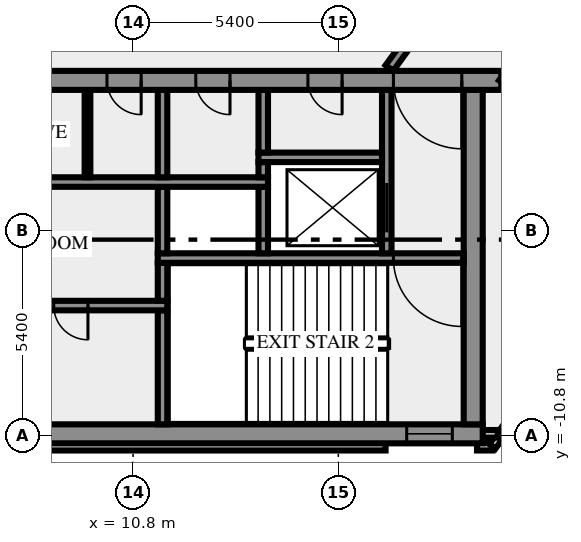
"""IFC4 building model, lengths in metres.
Left out: names, types, materials, properties, quantities, classifications, styles, units other than length and angle.
Written with IfcOpenShell. Run it as: python <this file> out.ifc"""

import sys

from ifc_helpers import new_model, si_unit, direction, frame, frame_2d, origin, place, context, subcontext, project, spatial, rectangle, extrude, element, fill, save


model = new_model("IFC4")
c1 = context("Model", 3, precision=1e-05, world=origin(), true_north=direction((0.0, 1.0)))
c2 = subcontext(c1, "Body", "Model", "MODEL_VIEW")
j1 = project(units=[si_unit("LENGTHUNIT", "METRE"), si_unit("PLANEANGLEUNIT", "RADIAN")], contexts=[c1])
p1 = place(None, origin())
s1 = spatial("IfcSite", under=j1, at=p1, CompositionType="ELEMENT")
p2 = place(p1, origin())
s2 = spatial("IfcBuilding", under=s1, at=p2, CompositionType="ELEMENT")
p3 = place(p2, frame((0.0, 0.0, 265.0)))
s3 = spatial("IfcBuildingStorey", under=s2, at=p3, CompositionType="ELEMENT", Elevation=265.0)
p4 = place(p3, frame((-17.444, -11.088, 0.0), z_axis=(0.0, 0.0, 1.0), x_axis=(1.0, 0.0, 0.0)))
e1 = element("IfcWall", 1, at=p4, inside=s3, PredefinedType="SOLIDWALL", context=c2, shape_type="SweptSolid", body=[
    extrude(rectangle(XDim=34.888, YDim=0.2, at=frame_2d((17.444, 0.0))), origin(), (0.0, 0.0, 1.0), 3.65),
])
p5 = place(p3, frame((19.85, -11.088, 0.0), z_axis=(0.0, 0.0, 1.0), x_axis=(1.0, 0.0, 0.0)))
e2 = element("IfcWall", 2, at=p5, inside=s3, PredefinedType="SOLIDWALL", context=c2, shape_type="SweptSolid", body=[
    extrude(rectangle(XDim=0.406, YDim=0.2, at=frame_2d((0.203, 0.0))), origin(), (0.0, 0.0, 1.0), 3.65),
])
p6 = place(p3, frame((20.253, -11.083, 0.0), z_axis=(0.0, 0.0, 1.0), x_axis=(0.587766567315, 0.809030569476, 0.0)))
e3 = element("IfcWall", 3, at=p6, inside=s3, PredefinedType="SOLIDWALL", context=c2, shape_type="SweptSolid", body=[
    extrude(rectangle(XDim=2.688, YDim=0.2, at=frame_2d((1.344, 0.0))), origin(), (0.0, 0.0, 1.0), 3.65),
])
p7 = place(p3, frame((19.98, -10.75, 0.0), z_axis=(0.0, 0.0, 1.0), x_axis=(1.0, 0.0, 0.0)))
e4 = element("IfcWall", 4, at=p7, inside=s3, PredefinedType="SOLIDWALL", context=c2, shape_type="SweptSolid", body=[
    extrude(rectangle(XDim=0.417, YDim=0.2, at=frame_2d((0.208, 0.0))), origin(), (0.0, 0.0, 1.0), 3.65),
])
p8 = place(p3, frame((-20.0, -10.75, 0.0), z_axis=(0.0, 0.0, 1.0), x_axis=(1.0, 0.0, 0.0)))
e5 = element("IfcWall", 5, at=p8, inside=s3, PredefinedType="SHEAR", context=c2, shape_type="SweptSolid", body=[
    extrude(rectangle(XDim=40.0, YDim=0.5, at=frame_2d((20.0, 0.0))), origin(), (0.0, 0.0, 1.0), 3.65),
])
p9 = place(p8, frame((0.8, 0.0, 1.0)))
e6 = element("IfcOpeningElement", 6, at=p9, cuts=e5, PredefinedType="OPENING", context=c2, shape_type="SweptSolid", body=[
    extrude(rectangle(XDim=1.2, YDim=1.2, at=frame_2d((0.6, 0.6))), frame((0.0, 0.26, 0.0), z_axis=(0.0, -1.0, 0.0), x_axis=(1.0, 0.0, 0.0)), (0.0, 0.0, 1.0), 0.52),
])
p10 = place(p8, frame((38.0, 0.0, 1.0)))
e7 = element("IfcOpeningElement", 7, at=p10, cuts=e5, PredefinedType="OPENING", context=c2, shape_type="SweptSolid", body=[
    extrude(rectangle(XDim=1.2, YDim=1.2, at=frame_2d((0.6, 0.6))), frame((0.0, 0.26, 0.0), z_axis=(0.0, -1.0, 0.0), x_axis=(1.0, 0.0, 0.0)), (0.0, 0.0, 1.0), 0.52),
])
p11 = place(p3, frame((11.575, -10.5, 0.0), z_axis=(0.0, 0.0, 1.0), x_axis=(0.0, 1.0, 0.0)))
e8 = element("IfcWall", 8, at=p11, inside=s3, PredefinedType="SHEAR", context=c2, shape_type="SweptSolid", body=[
    extrude(rectangle(XDim=3.0, YDim=0.25, at=frame_2d((1.5, 0.0))), origin(), (0.0, 0.0, 1.0), 3.65),
])
p12 = place(p3, frame((19.75, -10.5, 0.0), z_axis=(0.0, 0.0, 1.0), x_axis=(0.0, 1.0, 0.0)))
e9 = element("IfcWall", 9, at=p12, inside=s3, PredefinedType="SHEAR", context=c2, shape_type="SweptSolid", body=[
    extrude(rectangle(XDim=8.8, YDim=0.5, at=frame_2d((4.4, 0.0))), origin(), (0.0, 0.0, 1.0), 3.65),
])
p13 = place(p3, frame((11.7, -7.375, 0.0), z_axis=(0.0, 0.0, 1.0), x_axis=(-1.0, 0.0, 0.0)))
e10 = element("IfcWall", 10, at=p13, inside=s3, PredefinedType="SHEAR", context=c2, shape_type="SweptSolid", body=[
    extrude(rectangle(XDim=23.4, YDim=0.25, at=frame_2d((11.7, 0.0))), origin(), (0.0, 0.0, 1.0), 3.65),
])
p14 = place(p13, frame((22.225, 0.0, 0.0)))
e11 = element("IfcOpeningElement", 11, at=p14, cuts=e10, PredefinedType="OPENING", context=c2, shape_type="SweptSolid", body=[
    extrude(rectangle(XDim=0.8, YDim=2.1, at=frame_2d((0.4, 1.05))), frame((0.0, 0.135, 0.0), z_axis=(0.0, -1.0, 0.0), x_axis=(1.0, 0.0, 0.0)), (0.0, 0.0, 1.0), 0.27),
])
p15 = place(p13, frame((20.2, 0.0, 0.0)))
e12 = element("IfcOpeningElement", 12, at=p15, cuts=e10, PredefinedType="OPENING", context=c2, shape_type="SweptSolid", body=[
    extrude(rectangle(XDim=1.1, YDim=2.1, at=frame_2d((0.55, 1.05))), frame((0.0, 0.135, 0.0), z_axis=(0.0, -1.0, 0.0), x_axis=(1.0, 0.0, 0.0)), (0.0, 0.0, 1.0), 0.27),
])
p16 = place(p13, frame((17.7, 0.0, 0.0)))
e13 = element("IfcOpeningElement", 13, at=p16, cuts=e10, PredefinedType="OPENING", context=c2, shape_type="SweptSolid", body=[
    extrude(rectangle(XDim=1.1, YDim=2.1, at=frame_2d((0.55, 1.05))), frame((0.0, 0.135, 0.0), z_axis=(0.0, -1.0, 0.0), x_axis=(1.0, 0.0, 0.0)), (0.0, 0.0, 1.0), 0.27),
])
p17 = place(p13, frame((15.975, 0.0, 0.0)))
e14 = element("IfcOpeningElement", 14, at=p17, cuts=e10, PredefinedType="OPENING", context=c2, shape_type="SweptSolid", body=[
    extrude(rectangle(XDim=0.8, YDim=2.1, at=frame_2d((0.4, 1.05))), frame((0.0, 0.135, 0.0), z_axis=(0.0, -1.0, 0.0), x_axis=(1.0, 0.0, 0.0)), (0.0, 0.0, 1.0), 0.27),
])
p18 = place(p13, frame((14.75, 0.0, 0.0)))
e15 = element("IfcOpeningElement", 15, at=p18, cuts=e10, PredefinedType="OPENING", context=c2, shape_type="SweptSolid", body=[
    extrude(rectangle(XDim=0.7, YDim=2.1, at=frame_2d((0.35, 1.05))), frame((0.0, 0.135, 0.0), z_axis=(0.0, -1.0, 0.0), x_axis=(1.0, 0.0, 0.0)), (0.0, 0.0, 1.0), 0.27),
])
p19 = place(p13, frame((13.35, 0.0, 0.0)))
e16 = element("IfcOpeningElement", 16, at=p19, cuts=e10, PredefinedType="OPENING", context=c2, shape_type="SweptSolid", body=[
    extrude(rectangle(XDim=0.9, YDim=2.1, at=frame_2d((0.45, 1.05))), frame((0.0, 0.135, 0.0), z_axis=(0.0, -1.0, 0.0), x_axis=(1.0, 0.0, 0.0)), (0.0, 0.0, 1.0), 0.27),
])
p20 = place(p13, frame((11.975, 0.0, 0.0)))
e17 = element("IfcOpeningElement", 17, at=p20, cuts=e10, PredefinedType="OPENING", context=c2, shape_type="SweptSolid", body=[
    extrude(rectangle(XDim=0.9, YDim=2.1, at=frame_2d((0.45, 1.05))), frame((0.0, 0.135, 0.0), z_axis=(0.0, -1.0, 0.0), x_axis=(1.0, 0.0, 0.0)), (0.0, 0.0, 1.0), 0.27),
])
p21 = place(p13, frame((10.5, 0.0, 0.0)))
e18 = element("IfcOpeningElement", 18, at=p21, cuts=e10, PredefinedType="OPENING", context=c2, shape_type="SweptSolid", body=[
    extrude(rectangle(XDim=0.9, YDim=2.1, at=frame_2d((0.45, 1.05))), frame((0.0, 0.135, 0.0), z_axis=(0.0, -1.0, 0.0), x_axis=(1.0, 0.0, 0.0)), (0.0, 0.0, 1.0), 0.27),
])
p22 = place(p13, frame((8.663, 0.0, 0.0)))
e19 = element("IfcOpeningElement", 19, at=p22, cuts=e10, PredefinedType="OPENING", context=c2, shape_type="SweptSolid", body=[
    extrude(rectangle(XDim=0.9, YDim=2.1, at=frame_2d((0.45, 1.05))), frame((0.0, 0.135, 0.0), z_axis=(0.0, -1.0, 0.0), x_axis=(1.0, 0.0, 0.0)), (0.0, 0.0, 1.0), 0.27),
])
p23 = place(p13, frame((6.05, 0.0, 0.0)))
e20 = element("IfcOpeningElement", 20, at=p23, cuts=e10, PredefinedType="OPENING", context=c2, shape_type="SweptSolid", body=[
    extrude(rectangle(XDim=0.9, YDim=2.1, at=frame_2d((0.45, 1.05))), frame((0.0, 0.135, 0.0), z_axis=(0.0, -1.0, 0.0), x_axis=(1.0, 0.0, 0.0)), (0.0, 0.0, 1.0), 0.27),
])
p24 = place(p13, frame((2.088, 0.0, 0.0)))
e21 = element("IfcOpeningElement", 21, at=p24, cuts=e10, PredefinedType="OPENING", context=c2, shape_type="SweptSolid", body=[
    extrude(rectangle(XDim=0.9, YDim=2.1, at=frame_2d((0.45, 1.05))), frame((0.0, 0.135, 0.0), z_axis=(0.0, -1.0, 0.0), x_axis=(1.0, 0.0, 0.0)), (0.0, 0.0, 1.0), 0.27),
])
p25 = place(p3, frame((11.575, -7.25, 0.0), z_axis=(0.0, 0.0, 1.0), x_axis=(0.0, 1.0, 0.0)))
e22 = element("IfcWall", 22, at=p25, inside=s3, PredefinedType="SHEAR", context=c2, shape_type="SweptSolid", body=[
    extrude(rectangle(XDim=1.0, YDim=0.25, at=frame_2d((0.5, 0.0))), origin(), (0.0, 0.0, 1.0), 3.65),
])
p26 = place(p3, frame((19.5, -6.125, 0.0), z_axis=(0.0, 0.0, 1.0), x_axis=(-1.0, 0.0, 0.0)))
e23 = element("IfcWall", 23, at=p26, inside=s3, PredefinedType="SHEAR", context=c2, shape_type="SweptSolid", body=[
    extrude(rectangle(XDim=8.05, YDim=0.25, at=frame_2d((4.025, 0.0))), origin(), (0.0, 0.0, 1.0), 3.65),
])
p27 = place(p26, frame((0.05, 0.0, 0.0)))
e24 = element("IfcOpeningElement", 24, at=p27, cuts=e23, PredefinedType="OPENING", context=c2, shape_type="SweptSolid", body=[
    extrude(rectangle(XDim=1.8, YDim=2.1, at=frame_2d((0.9, 1.05))), frame((0.0, 0.135, 0.0), z_axis=(0.0, -1.0, 0.0), x_axis=(1.0, 0.0, 0.0)), (0.0, 0.0, 1.0), 0.27),
])
for number, where, z_axis, x_axis in (
    (25, (11.575, -6.0, 0.0), (0.0, 0.0, 1.0), (0.0, 1.0, 0.0)),
    (26, (14.225, -6.0, 0.0), (0.0, 0.0, 1.0), (0.0, 1.0, 0.0)),
):
    element("IfcWall", number, at=place(p3, frame(where, z_axis=z_axis, x_axis=x_axis)), inside=s3, PredefinedType="SHEAR", context=c2, shape_type="SweptSolid", body=[
        extrude(rectangle(XDim=1.75, YDim=0.25, at=frame_2d((0.875, 0.0))), origin(), (0.0, 0.0, 1.0), 3.65),
    ])
p28 = place(p3, frame((17.475, -6.0, 0.0), z_axis=(0.0, 0.0, 1.0), x_axis=(0.0, 1.0, 0.0)))
e27 = element("IfcWall", 27, at=p28, inside=s3, PredefinedType="SHEAR", context=c2, shape_type="SweptSolid", body=[
    extrude(rectangle(XDim=4.3, YDim=0.25, at=frame_2d((2.15, 0.0))), origin(), (0.0, 0.0, 1.0), 3.65),
])
p29 = place(p28, frame((0.55, 0.0, 0.0)))
e28 = element("IfcOpeningElement", 28, at=p29, cuts=e27, PredefinedType="OPENING", context=c2, shape_type="SweptSolid", body=[
    extrude(rectangle(XDim=1.3, YDim=2.1, at=frame_2d((0.65, 1.05))), frame((0.0, 0.135, 0.0), z_axis=(0.0, -1.0, 0.0), x_axis=(1.0, 0.0, 0.0)), (0.0, 0.0, 1.0), 0.27),
])
p30 = place(p3, frame((1.45, -4.125, 0.0), z_axis=(0.0, 0.0, 1.0), x_axis=(1.0, 0.0, 0.0)))
e29 = element("IfcWall", 29, at=p30, inside=s3, PredefinedType="SHEAR", context=c2, shape_type="SweptSolid", body=[
    extrude(rectangle(XDim=12.9, YDim=0.25, at=frame_2d((6.45, 0.0))), origin(), (0.0, 0.0, 1.0), 3.65),
])
p31 = place(p30, frame((0.7, 0.0, 0.0)))
e30 = element("IfcOpeningElement", 30, at=p31, cuts=e29, PredefinedType="OPENING", context=c2, shape_type="SweptSolid", body=[
    extrude(rectangle(XDim=1.3, YDim=2.1, at=frame_2d((0.65, 1.05))), frame((0.0, 0.135, 0.0), z_axis=(0.0, -1.0, 0.0), x_axis=(1.0, 0.0, 0.0)), (0.0, 0.0, 1.0), 0.27),
])
p32 = place(p3, frame((9.6, -4.0, 0.0), z_axis=(0.0, 0.0, 1.0), x_axis=(0.0, 1.0, 0.0)))
e31 = element("IfcWall", 31, at=p32, inside=s3, PredefinedType="PARTITIONING", context=c2, shape_type="SweptSolid", body=[
    extrude(rectangle(XDim=2.3, YDim=0.15, at=frame_2d((1.15, 0.0))), origin(), (0.0, 0.0, 1.0), 3.65),
])
p33 = place(p3, frame((11.575, -4.0, 0.0), z_axis=(0.0, 0.0, 1.0), x_axis=(0.0, 1.0, 0.0)))
e32 = element("IfcWall", 32, at=p33, inside=s3, PredefinedType="SHEAR", context=c2, shape_type="SweptSolid", body=[
    extrude(rectangle(XDim=2.3, YDim=0.25, at=frame_2d((1.15, 0.0))), origin(), (0.0, 0.0, 1.0), 3.65),
])
p34 = place(p3, frame((14.225, -4.0, 0.0), z_axis=(0.0, 0.0, 1.0), x_axis=(0.0, 1.0, 0.0)))
e33 = element("IfcWall", 33, at=p34, inside=s3, PredefinedType="SHEAR", context=c2, shape_type="SweptSolid", body=[
    extrude(rectangle(XDim=0.4, YDim=0.25, at=frame_2d((0.2, 0.0))), origin(), (0.0, 0.0, 1.0), 3.65),
])
p35 = place(p3, frame((14.1, -3.475, 0.0), z_axis=(0.0, 0.0, 1.0), x_axis=(1.0, 0.0, 0.0)))
e34 = element("IfcWall", 34, at=p35, inside=s3, PredefinedType="SHEAR", context=c2, shape_type="SweptSolid", body=[
    extrude(rectangle(XDim=3.25, YDim=0.25, at=frame_2d((1.625, 0.0))), origin(), (0.0, 0.0, 1.0), 3.65),
])
p36 = place(p3, frame((14.225, -3.35, 0.0), z_axis=(0.0, 0.0, 1.0), x_axis=(0.0, 1.0, 0.0)))
e35 = element("IfcWall", 35, at=p36, inside=s3, PredefinedType="SHEAR", context=c2, shape_type="SweptSolid", body=[
    extrude(rectangle(XDim=1.65, YDim=0.25, at=frame_2d((0.825, 0.0))), origin(), (0.0, 0.0, 1.0), 3.65),
])
p37 = place(p3, frame((20.49, -1.45, 0.0), z_axis=(0.0, 0.0, 1.0), x_axis=(-1.0, 0.0, 0.0)))
e36 = element("IfcWall", 36, at=p37, inside=s3, PredefinedType="SHEAR", context=c2, shape_type="SweptSolid", body=[
    extrude(rectangle(XDim=40.98, YDim=0.5, at=frame_2d((20.49, 0.0))), origin(), (0.0, 0.0, 1.0), 3.65),
])
p38 = place(p37, frame((38.14, 0.0, 0.0)))
e37 = element("IfcOpeningElement", 37, at=p38, cuts=e36, PredefinedType="OPENING", context=c2, shape_type="SweptSolid", body=[
    extrude(rectangle(XDim=1.8, YDim=2.1, at=frame_2d((0.9, 1.05))), frame((0.0, 0.26, 0.0), z_axis=(0.0, -1.0, 0.0), x_axis=(1.0, 0.0, 0.0)), (0.0, 0.0, 1.0), 0.52),
])
p39 = place(p37, frame((36.728, 0.0, 0.0)))
e38 = element("IfcOpeningElement", 38, at=p39, cuts=e36, PredefinedType="OPENING", context=c2, shape_type="SweptSolid", body=[
    extrude(rectangle(XDim=0.8, YDim=2.1, at=frame_2d((0.4, 1.05))), frame((0.0, 0.26, 0.0), z_axis=(0.0, -1.0, 0.0), x_axis=(1.0, 0.0, 0.0)), (0.0, 0.0, 1.0), 0.52),
])
p40 = place(p37, frame((35.153, 0.0, 0.0)))
e39 = element("IfcOpeningElement", 39, at=p40, cuts=e36, PredefinedType="OPENING", context=c2, shape_type="SweptSolid", body=[
    extrude(rectangle(XDim=0.8, YDim=2.1, at=frame_2d((0.4, 1.05))), frame((0.0, 0.26, 0.0), z_axis=(0.0, -1.0, 0.0), x_axis=(1.0, 0.0, 0.0)), (0.0, 0.0, 1.0), 0.52),
])
p41 = place(p37, frame((32.94, 0.0, 0.0)))
e40 = element("IfcOpeningElement", 40, at=p41, cuts=e36, PredefinedType="OPENING", context=c2, shape_type="SweptSolid", body=[
    extrude(rectangle(XDim=0.9, YDim=2.1, at=frame_2d((0.45, 1.05))), frame((0.0, 0.26, 0.0), z_axis=(0.0, -1.0, 0.0), x_axis=(1.0, 0.0, 0.0)), (0.0, 0.0, 1.0), 0.52),
])
p42 = place(p37, frame((31.015, 0.0, 0.0)))
e41 = element("IfcOpeningElement", 41, at=p42, cuts=e36, PredefinedType="OPENING", context=c2, shape_type="SweptSolid", body=[
    extrude(rectangle(XDim=0.8, YDim=2.1, at=frame_2d((0.4, 1.05))), frame((0.0, 0.26, 0.0), z_axis=(0.0, -1.0, 0.0), x_axis=(1.0, 0.0, 0.0)), (0.0, 0.0, 1.0), 0.52),
])
p43 = place(p37, frame((24.765, 0.0, 0.0)))
e42 = element("IfcOpeningElement", 42, at=p43, cuts=e36, PredefinedType="OPENING", context=c2, shape_type="SweptSolid", body=[
    extrude(rectangle(XDim=0.8, YDim=2.1, at=frame_2d((0.4, 1.05))), frame((0.0, 0.26, 0.0), z_axis=(0.0, -1.0, 0.0), x_axis=(1.0, 0.0, 0.0)), (0.0, 0.0, 1.0), 0.52),
])
p44 = place(p37, frame((19.59, 0.0, 0.0)))
e43 = element("IfcOpeningElement", 43, at=p44, cuts=e36, PredefinedType="OPENING", context=c2, shape_type="SweptSolid", body=[
    extrude(rectangle(XDim=2.0, YDim=2.1, at=frame_2d((1.0, 1.05))), frame((0.0, 0.26, 0.0), z_axis=(0.0, -1.0, 0.0), x_axis=(1.0, 0.0, 0.0)), (0.0, 0.0, 1.0), 0.52),
])
p45 = place(p37, frame((13.202, 0.0, 0.0)))
e44 = element("IfcOpeningElement", 44, at=p45, cuts=e36, PredefinedType="OPENING", context=c2, shape_type="SweptSolid", body=[
    extrude(rectangle(XDim=0.9, YDim=2.1, at=frame_2d((0.45, 1.05))), frame((0.0, 0.26, 0.0), z_axis=(0.0, -1.0, 0.0), x_axis=(1.0, 0.0, 0.0)), (0.0, 0.0, 1.0), 0.52),
])
p46 = place(p37, frame((9.478, 0.0, 0.0)))
e45 = element("IfcOpeningElement", 45, at=p46, cuts=e36, PredefinedType="OPENING", context=c2, shape_type="SweptSolid", body=[
    extrude(rectangle(XDim=0.9, YDim=2.1, at=frame_2d((0.45, 1.05))), frame((0.0, 0.26, 0.0), z_axis=(0.0, -1.0, 0.0), x_axis=(1.0, 0.0, 0.0)), (0.0, 0.0, 1.0), 0.52),
])
p47 = place(p37, frame((7.14, 0.0, 0.0)))
e46 = element("IfcOpeningElement", 46, at=p47, cuts=e36, PredefinedType="OPENING", context=c2, shape_type="SweptSolid", body=[
    extrude(rectangle(XDim=0.9, YDim=2.1, at=frame_2d((0.45, 1.05))), frame((0.0, 0.26, 0.0), z_axis=(0.0, -1.0, 0.0), x_axis=(1.0, 0.0, 0.0)), (0.0, 0.0, 1.0), 0.52),
])
p48 = place(p37, frame((4.19, 0.0, 0.0)))
e47 = element("IfcOpeningElement", 47, at=p48, cuts=e36, PredefinedType="OPENING", context=c2, shape_type="SweptSolid", body=[
    extrude(rectangle(XDim=0.9, YDim=2.1, at=frame_2d((0.45, 1.05))), frame((0.0, 0.26, 0.0), z_axis=(0.0, -1.0, 0.0), x_axis=(1.0, 0.0, 0.0)), (0.0, 0.0, 1.0), 0.52),
])
p49 = place(p37, frame((1.04, 0.0, 0.0)))
e48 = element("IfcOpeningElement", 48, at=p49, cuts=e36, PredefinedType="OPENING", context=c2, shape_type="SweptSolid", body=[
    extrude(rectangle(XDim=1.8, YDim=2.1, at=frame_2d((0.9, 1.05))), frame((0.0, 0.26, 0.0), z_axis=(0.0, -1.0, 0.0), x_axis=(1.0, 0.0, 0.0)), (0.0, 0.0, 1.0), 0.52),
])
p50 = place(p3, frame((17.545, -1.125, 0.0), z_axis=(0.0, 0.0, 1.0), x_axis=(0.58779555165, 0.809009511354, 0.0)))
e49 = element("IfcWall", 49, at=p50, inside=s3, PredefinedType="SOLIDWALL", context=c2, shape_type="SweptSolid", body=[
    extrude(rectangle(XDim=18.103, YDim=0.25, at=frame_2d((9.052, 0.0))), origin(), (0.0, 0.0, 1.0), 3.65),
])
p51 = place(p50, frame((16.728, 0.0, 0.0)))
e50 = element("IfcOpeningElement", 50, at=p51, cuts=e49, PredefinedType="OPENING", context=c2, shape_type="SweptSolid", body=[
    extrude(rectangle(XDim=0.9, YDim=2.1, at=frame_2d((0.45, 1.05))), frame((0.0, 0.135, 0.0), z_axis=(0.0, -1.0, 0.0), x_axis=(1.0, 0.0, 0.0)), (0.0, 0.0, 1.0), 0.27),
])
p52 = place(p3, frame((30.183, 11.761, 0.0), z_axis=(0.0, 0.0, 1.0), x_axis=(-0.587781762867, -0.80901952958, 0.0)))
e51 = element("IfcWall", 51, at=p52, inside=s3, PredefinedType="SOLIDWALL", context=c2, shape_type="SweptSolid", body=[
    extrude(rectangle(XDim=16.42, YDim=0.25, at=frame_2d((8.21, 0.0))), origin(), (0.0, 0.0, 1.0), 3.65),
])
p53 = place(p52, frame((5.005, 0.0, 0.0)))
e52 = element("IfcOpeningElement", 52, at=p53, cuts=e51, PredefinedType="OPENING", context=c2, shape_type="SweptSolid", body=[
    extrude(rectangle(XDim=0.9, YDim=2.1, at=frame_2d((0.45, 1.05))), frame((0.0, 0.135, 0.0), z_axis=(0.0, -1.0, 0.0), x_axis=(1.0, 0.0, 0.0)), (0.0, 0.0, 1.0), 0.27),
])
p54 = place(p52, frame((14.988, 0.0, 0.0)))
e53 = element("IfcOpeningElement", 53, at=p54, cuts=e51, PredefinedType="OPENING", context=c2, shape_type="SweptSolid", body=[
    extrude(rectangle(XDim=0.9, YDim=2.1, at=frame_2d((0.45, 1.05))), frame((0.0, 0.135, 0.0), z_axis=(0.0, -1.0, 0.0), x_axis=(1.0, 0.0, 0.0)), (0.0, 0.0, 1.0), 0.27),
])
p55 = place(p10, origin())
e54 = element("IfcWindow", 54, at=p55, inside=s3, PartitioningType="SINGLE_PANEL", PredefinedType="WINDOW", context=c2, shape_type="SweptSolid", body=[
    extrude(rectangle(XDim=1.2, YDim=1.2, at=frame_2d((0.6, 0.6))), frame((0.0, 0.03, 0.0), z_axis=(0.0, -1.0, 0.0), x_axis=(1.0, 0.0, 0.0)), (0.0, 0.0, 1.0), 0.06),
])
fill(e7, e54)
p56 = place(p24, origin())
e55 = element("IfcDoor", 55, at=p56, inside=s3, OperationType="SINGLE_SWING_LEFT", PredefinedType="DOOR", context=c2, shape_type="SweptSolid", body=[
    extrude(rectangle(XDim=0.9, YDim=2.1, at=frame_2d((0.45, 1.05))), frame((0.0, 0.025, 0.0), z_axis=(0.0, -1.0, 0.0), x_axis=(1.0, 0.0, 0.0)), (0.0, 0.0, 1.0), 0.05),
])
fill(e21, e55)
p57 = place(p27, origin())
e56 = element("IfcDoor", 56, at=p57, inside=s3, OperationType="DOUBLE_DOOR_SINGLE_SWING", PredefinedType="DOOR", context=c2, shape_type="SweptSolid", body=[
    extrude(rectangle(XDim=1.8, YDim=2.1, at=frame_2d((0.9, 1.05))), frame((0.0, 0.025, 0.0), z_axis=(0.0, -1.0, 0.0), x_axis=(1.0, 0.0, 0.0)), (0.0, 0.0, 1.0), 0.05),
])
fill(e24, e56)
p58 = place(p29, origin())
e57 = element("IfcDoor", 57, at=p58, inside=s3, OperationType="DOUBLE_DOOR_SLIDING", PredefinedType="DOOR", context=c2, shape_type="SweptSolid", body=[
    extrude(rectangle(XDim=1.3, YDim=2.1, at=frame_2d((0.65, 1.05))), frame((0.0, 0.025, 0.0), z_axis=(0.0, -1.0, 0.0), x_axis=(1.0, 0.0, 0.0)), (0.0, 0.0, 1.0), 0.05),
])
fill(e28, e57)
p59 = place(p46, origin())
e58 = element("IfcDoor", 58, at=p59, inside=s3, OperationType="SINGLE_SWING_LEFT", PredefinedType="DOOR", context=c2, shape_type="SweptSolid", body=[
    extrude(rectangle(XDim=0.9, YDim=2.1, at=frame_2d((0.45, 1.05))), frame((0.0, 0.025, 0.0), z_axis=(0.0, -1.0, 0.0), x_axis=(1.0, 0.0, 0.0)), (0.0, 0.0, 1.0), 0.05),
])
fill(e45, e58)
p60 = place(p47, origin())
e59 = element("IfcDoor", 59, at=p60, inside=s3, OperationType="SINGLE_SWING_LEFT", PredefinedType="DOOR", context=c2, shape_type="SweptSolid", body=[
    extrude(rectangle(XDim=0.9, YDim=2.1, at=frame_2d((0.45, 1.05))), frame((0.0, 0.025, 0.0), z_axis=(0.0, -1.0, 0.0), x_axis=(1.0, 0.0, 0.0)), (0.0, 0.0, 1.0), 0.05),
])
fill(e46, e59)
p61 = place(p48, origin())
e60 = element("IfcDoor", 60, at=p61, inside=s3, OperationType="SINGLE_SWING_LEFT", PredefinedType="DOOR", context=c2, shape_type="SweptSolid", body=[
    extrude(rectangle(XDim=0.9, YDim=2.1, at=frame_2d((0.45, 1.05))), frame((0.0, 0.025, 0.0), z_axis=(0.0, -1.0, 0.0), x_axis=(1.0, 0.0, 0.0)), (0.0, 0.0, 1.0), 0.05),
])
fill(e47, e60)
p62 = place(p49, origin())
e61 = element("IfcDoor", 61, at=p62, inside=s3, OperationType="DOUBLE_DOOR_SINGLE_SWING", PredefinedType="DOOR", context=c2, shape_type="SweptSolid", body=[
    extrude(rectangle(XDim=1.8, YDim=2.1, at=frame_2d((0.9, 1.05))), frame((0.0, 0.025, 0.0), z_axis=(0.0, -1.0, 0.0), x_axis=(1.0, 0.0, 0.0)), (0.0, 0.0, 1.0), 0.05),
])
fill(e48, e61)
save(model, sys.argv[1])
